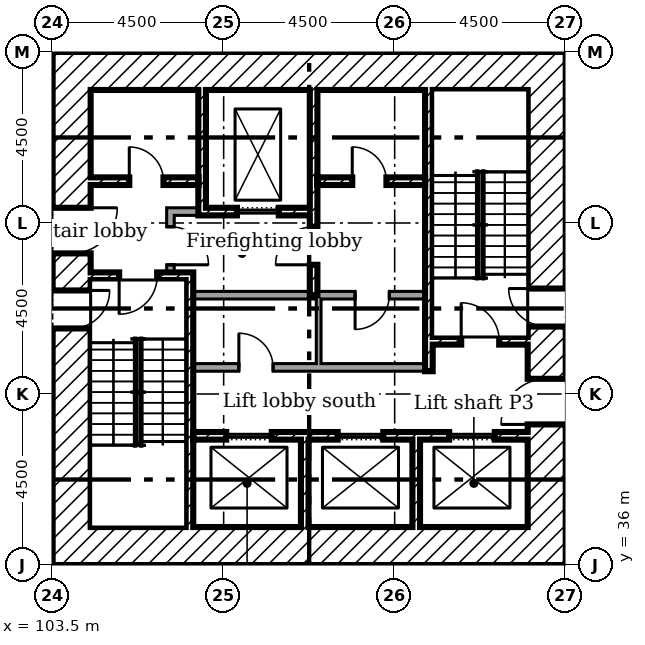
"""IFC4 building model, lengths in metres.
Left out: names, types, materials, properties, quantities, classifications, styles, units other than length and angle.
Written with IfcOpenShell. Run it as: python <this file> out.ifc"""

import sys

from ifc_helpers import new_model, si_unit, direction, frame, frame_2d, origin, place, context, subcontext, project, spatial, rectangle, extrude, element, fill, save


model = new_model("IFC4")
c1 = context("Model", 3, precision=1e-05, world=origin(), true_north=direction((0.0, 1.0)))
c2 = subcontext(c1, "Body", "Model", "MODEL_VIEW")
j1 = project(units=[si_unit("LENGTHUNIT", "METRE"), si_unit("PLANEANGLEUNIT", "RADIAN")], contexts=[c1])
p1 = place(None, origin())
s1 = spatial("IfcSite", under=j1, at=p1, CompositionType="ELEMENT")
p2 = place(p1, origin())
s2 = spatial("IfcBuilding", under=s1, at=p2, CompositionType="ELEMENT")
p3 = place(p2, frame((0.0, 0.0, 6.0)))
s3 = spatial("IfcBuildingStorey", under=s2, at=p3, CompositionType="ELEMENT", Elevation=6.0)
p4 = place(p3, frame((116.5, 36.0, 0.0), z_axis=(0.0, 0.0, 1.0), x_axis=(0.0, 1.0, 0.0)))
e1 = element("IfcWall", 1, at=p4, inside=s3, PredefinedType="SHEAR", context=c2, shape_type="SweptSolid", body=[
    extrude(rectangle(XDim=13.5, YDim=1.0, at=frame_2d((6.75, 0.0))), origin(), (0.0, 0.0, 1.0), 5.0),
])
p5 = place(p4, frame((3.7, 0.0, 0.0)))
e2 = element("IfcOpeningElement", 2, at=p5, cuts=e1, PredefinedType="OPENING", context=c2, shape_type="SweptSolid", body=[
    extrude(rectangle(XDim=1.2, YDim=2.1, at=frame_2d((0.6, 1.05))), frame((0.0, 0.51, 0.0), z_axis=(0.0, -1.0, 0.0), x_axis=(1.0, 0.0, 0.0)), (0.0, 0.0, 1.0), 1.02),
])
p6 = place(p4, frame((6.275, 0.0, 0.0)))
e3 = element("IfcOpeningElement", 3, at=p6, cuts=e1, PredefinedType="OPENING", context=c2, shape_type="SweptSolid", body=[
    extrude(rectangle(XDim=1.0, YDim=2.1, at=frame_2d((0.5, 1.05))), frame((0.0, 0.51, 0.0), z_axis=(0.0, -1.0, 0.0), x_axis=(1.0, 0.0, 0.0)), (0.0, 0.0, 1.0), 1.02),
])
for number, where in (
    (4, (104.5, 49.0, 0.0)),
    (5, (104.5, 36.5, 0.0)),
):
    element("IfcWall", number, at=place(p3, frame(where)), inside=s3, PredefinedType="SHEAR", context=c2, shape_type="SweptSolid", body=[
        extrude(rectangle(XDim=11.5, YDim=1.0, at=frame_2d((5.75, 0.0))), origin(), (0.0, 0.0, 1.0), 5.0),
    ])
p7 = place(p3, frame((104.0, 36.0, 0.0), z_axis=(0.0, 0.0, 1.0), x_axis=(0.0, 1.0, 0.0)))
e6 = element("IfcWall", 6, at=p7, inside=s3, PredefinedType="SHEAR", context=c2, shape_type="SweptSolid", body=[
    extrude(rectangle(XDim=13.5, YDim=1.0, at=frame_2d((6.75, 0.0))), origin(), (0.0, 0.0, 1.0), 5.0),
])
p8 = place(p7, frame((8.2, 0.0, 0.0)))
e7 = element("IfcOpeningElement", 7, at=p8, cuts=e6, PredefinedType="OPENING", context=c2, shape_type="SweptSolid", body=[
    extrude(rectangle(XDim=1.2, YDim=2.1, at=frame_2d((0.6, 1.05))), frame((0.0, 0.51, 0.0), z_axis=(0.0, -1.0, 0.0), x_axis=(1.0, 0.0, 0.0)), (0.0, 0.0, 1.0), 1.02),
])
p9 = place(p7, frame((6.225, 0.0, 0.0)))
e8 = element("IfcOpeningElement", 8, at=p9, cuts=e6, PredefinedType="OPENING", context=c2, shape_type="SweptSolid", body=[
    extrude(rectangle(XDim=1.0, YDim=2.1, at=frame_2d((0.5, 1.05))), frame((0.0, 0.51, 0.0), z_axis=(0.0, -1.0, 0.0), x_axis=(1.0, 0.0, 0.0)), (0.0, 0.0, 1.0), 1.02),
])
p10 = place(p3, frame((107.433, 48.5, 0.0), z_axis=(0.0, 0.0, 1.0), x_axis=(0.0, -1.0, 0.0)))
e9 = element("IfcWall", 9, at=p10, inside=s3, PredefinedType="SHEAR", context=c2, shape_type="SweptSolid", body=[
    extrude(rectangle(XDim=3.3, YDim=0.2, at=frame_2d((1.65, 0.0))), origin(), (0.0, 0.0, 1.0), 5.0),
])
p11 = place(p3, frame((110.367, 48.5, 0.0), z_axis=(0.0, 0.0, 1.0), x_axis=(0.0, -1.0, 0.0)))
e10 = element("IfcWall", 10, at=p11, inside=s3, PredefinedType="SHEAR", context=c2, shape_type="SweptSolid", body=[
    extrude(rectangle(XDim=5.4, YDim=0.2, at=frame_2d((2.7, 0.0))), origin(), (0.0, 0.0, 1.0), 5.0),
])
p12 = place(p11, frame((3.6, 0.0, 0.0)))
e11 = element("IfcOpeningElement", 11, at=p12, cuts=e10, PredefinedType="OPENING", context=c2, shape_type="SweptSolid", body=[
    extrude(rectangle(XDim=1.0, YDim=2.1, at=frame_2d((0.5, 1.05))), frame((0.0, 0.11, 0.0), z_axis=(0.0, -1.0, 0.0), x_axis=(1.0, 0.0, 0.0)), (0.0, 0.0, 1.0), 0.22),
])
for number, where, z_axis, x_axis in (
    (12, (110.133, 37.0, 0.0), (0.0, 0.0, 1.0), (0.0, 1.0, 0.0)),
    (13, (113.067, 37.0, 0.0), (0.0, 0.0, 1.0), (0.0, 1.0, 0.0)),
):
    element("IfcWall", number, at=place(p3, frame(where, z_axis=z_axis, x_axis=x_axis)), inside=s3, PredefinedType="SHEAR", context=c2, shape_type="SweptSolid", body=[
        extrude(rectangle(XDim=2.3, YDim=0.2, at=frame_2d((1.15, 0.0))), origin(), (0.0, 0.0, 1.0), 5.0),
    ])
p13 = place(p3, frame((106.5, 45.3, 0.0)))
e14 = element("IfcWall", 14, at=p13, inside=s3, PredefinedType="PARTITIONING", context=c2, shape_type="SweptSolid", body=[
    extrude(rectangle(XDim=0.833, YDim=0.2, at=frame_2d((0.417, 0.0))), origin(), (0.0, 0.0, 1.0), 5.0),
])
p14 = place(p3, frame((106.6, 43.7, 0.0), z_axis=(0.0, 0.0, 1.0), x_axis=(0.0, 1.0, 0.0)))
e15 = element("IfcWall", 15, at=p14, inside=s3, PredefinedType="PARTITIONING", context=c2, shape_type="SweptSolid", body=[
    extrude(rectangle(XDim=1.5, YDim=0.2, at=frame_2d((0.75, 0.0))), origin(), (0.0, 0.0, 1.0), 5.0),
])
p15 = place(p14, frame((0.2, 0.0, 0.0)))
e16 = element("IfcOpeningElement", 16, at=p15, cuts=e15, PredefinedType="OPENING", context=c2, shape_type="SweptSolid", body=[
    extrude(rectangle(XDim=1.0, YDim=2.1, at=frame_2d((0.5, 1.05))), frame((0.0, 0.11, 0.0), z_axis=(0.0, -1.0, 0.0), x_axis=(1.0, 0.0, 0.0)), (0.0, 0.0, 1.0), 0.22),
])
p16 = place(p3, frame((104.5, 46.1, 0.0)))
e17 = element("IfcWall", 17, at=p16, inside=s3, PredefinedType="SHEAR", context=c2, shape_type="SweptSolid", body=[
    extrude(rectangle(XDim=2.833, YDim=0.2, at=frame_2d((1.417, 0.0))), origin(), (0.0, 0.0, 1.0), 5.0),
])
p17 = place(p16, frame((1.017, 0.0, 0.0)))
e18 = element("IfcOpeningElement", 18, at=p17, cuts=e17, PredefinedType="OPENING", context=c2, shape_type="SweptSolid", body=[
    extrude(rectangle(XDim=0.9, YDim=2.1, at=frame_2d((0.45, 1.05))), frame((0.0, 0.11, 0.0), z_axis=(0.0, -1.0, 0.0), x_axis=(1.0, 0.0, 0.0)), (0.0, 0.0, 1.0), 0.22),
])
p18 = place(p3, frame((110.467, 46.1, 0.0)))
e19 = element("IfcWall", 19, at=p18, inside=s3, PredefinedType="SHEAR", context=c2, shape_type="SweptSolid", body=[
    extrude(rectangle(XDim=2.833, YDim=0.2, at=frame_2d((1.417, 0.0))), origin(), (0.0, 0.0, 1.0), 5.0),
])
p19 = place(p18, frame((0.917, 0.0, 0.0)))
e20 = element("IfcOpeningElement", 20, at=p19, cuts=e19, PredefinedType="OPENING", context=c2, shape_type="SweptSolid", body=[
    extrude(rectangle(XDim=0.9, YDim=2.1, at=frame_2d((0.45, 1.05))), frame((0.0, 0.11, 0.0), z_axis=(0.0, -1.0, 0.0), x_axis=(1.0, 0.0, 0.0)), (0.0, 0.0, 1.0), 0.22),
])
p20 = place(p3, frame((107.533, 45.3, 0.0)))
e21 = element("IfcWall", 21, at=p20, inside=s3, PredefinedType="SHEAR", context=c2, shape_type="SweptSolid", body=[
    extrude(rectangle(XDim=2.733, YDim=0.2, at=frame_2d((1.367, 0.0))), origin(), (0.0, 0.0, 1.0), 5.0),
])
p21 = place(p20, frame((0.817, 0.0, 0.0)))
e22 = element("IfcOpeningElement", 22, at=p21, cuts=e21, PredefinedType="OPENING", context=c2, shape_type="SweptSolid", body=[
    extrude(rectangle(XDim=1.1, YDim=2.1, at=frame_2d((0.55, 1.05))), frame((0.0, 0.11, 0.0), z_axis=(0.0, -1.0, 0.0), x_axis=(1.0, 0.0, 0.0)), (0.0, 0.0, 1.0), 0.22),
])
p22 = place(p3, frame((107.2, 39.4, 0.0)))
e23 = element("IfcWall", 23, at=p22, inside=s3, PredefinedType="SHEAR", context=c2, shape_type="SweptSolid", body=[
    extrude(rectangle(XDim=8.8, YDim=0.2, at=frame_2d((4.4, 0.0))), origin(), (0.0, 0.0, 1.0), 5.0),
])
p23 = place(p22, frame((0.867, 0.0, 0.0)))
e24 = element("IfcOpeningElement", 24, at=p23, cuts=e23, PredefinedType="OPENING", context=c2, shape_type="SweptSolid", body=[
    extrude(rectangle(XDim=1.2, YDim=2.1, at=frame_2d((0.6, 1.05))), frame((0.0, 0.11, 0.0), z_axis=(0.0, -1.0, 0.0), x_axis=(1.0, 0.0, 0.0)), (0.0, 0.0, 1.0), 0.22),
])
p24 = place(p22, frame((3.8, 0.0, 0.0)))
e25 = element("IfcOpeningElement", 25, at=p24, cuts=e23, PredefinedType="OPENING", context=c2, shape_type="SweptSolid", body=[
    extrude(rectangle(XDim=1.2, YDim=2.1, at=frame_2d((0.6, 1.05))), frame((0.0, 0.11, 0.0), z_axis=(0.0, -1.0, 0.0), x_axis=(1.0, 0.0, 0.0)), (0.0, 0.0, 1.0), 0.22),
])
p25 = place(p22, frame((6.733, 0.0, 0.0)))
e26 = element("IfcOpeningElement", 26, at=p25, cuts=e23, PredefinedType="OPENING", context=c2, shape_type="SweptSolid", body=[
    extrude(rectangle(XDim=1.2, YDim=2.1, at=frame_2d((0.6, 1.05))), frame((0.0, 0.11, 0.0), z_axis=(0.0, -1.0, 0.0), x_axis=(1.0, 0.0, 0.0)), (0.0, 0.0, 1.0), 0.22),
])
p26 = place(p3, frame((107.1, 37.0, 0.0), z_axis=(0.0, 0.0, 1.0), x_axis=(0.0, 1.0, 0.0)))
e27 = element("IfcWall", 27, at=p26, inside=s3, PredefinedType="SHEAR", context=c2, shape_type="SweptSolid", body=[
    extrude(rectangle(XDim=6.7, YDim=0.2, at=frame_2d((3.35, 0.0))), origin(), (0.0, 0.0, 1.0), 5.0),
])
p27 = place(p3, frame((104.5, 43.6, 0.0)))
e28 = element("IfcWall", 28, at=p27, inside=s3, PredefinedType="SHEAR", context=c2, shape_type="SweptSolid", body=[
    extrude(rectangle(XDim=2.5, YDim=0.2, at=frame_2d((1.25, 0.0))), origin(), (0.0, 0.0, 1.0), 5.0),
])
p28 = place(p27, frame((0.75, 0.0, 0.0)))
e29 = element("IfcOpeningElement", 29, at=p28, cuts=e28, PredefinedType="OPENING", context=c2, shape_type="SweptSolid", body=[
    extrude(rectangle(XDim=1.0, YDim=2.1, at=frame_2d((0.5, 1.05))), frame((0.0, 0.11, 0.0), z_axis=(0.0, -1.0, 0.0), x_axis=(1.0, 0.0, 0.0)), (0.0, 0.0, 1.0), 0.22),
])
p29 = place(p3, frame((113.5, 41.9, 0.0)))
e30 = element("IfcWall", 30, at=p29, inside=s3, PredefinedType="SHEAR", context=c2, shape_type="SweptSolid", body=[
    extrude(rectangle(XDim=2.5, YDim=0.2, at=frame_2d((1.25, 0.0))), origin(), (0.0, 0.0, 1.0), 5.0),
])
p30 = place(p29, frame((0.75, 0.0, 0.0)))
e31 = element("IfcOpeningElement", 31, at=p30, cuts=e30, PredefinedType="OPENING", context=c2, shape_type="SweptSolid", body=[
    extrude(rectangle(XDim=1.0, YDim=2.1, at=frame_2d((0.5, 1.05))), frame((0.0, 0.11, 0.0), z_axis=(0.0, -1.0, 0.0), x_axis=(1.0, 0.0, 0.0)), (0.0, 0.0, 1.0), 0.22),
])
p31 = place(p3, frame((113.4, 41.1, 0.0), z_axis=(0.0, 0.0, 1.0), x_axis=(0.0, 1.0, 0.0)))
e32 = element("IfcWall", 32, at=p31, inside=s3, PredefinedType="SHEAR", context=c2, shape_type="SweptSolid", body=[
    extrude(rectangle(XDim=7.4, YDim=0.2, at=frame_2d((3.7, 0.0))), origin(), (0.0, 0.0, 1.0), 5.0),
])
p32 = place(p3, frame((107.2, 43.1, 0.0)))
e33 = element("IfcWall", 33, at=p32, inside=s3, PredefinedType="PARTITIONING", context=c2, shape_type="SweptSolid", body=[
    extrude(rectangle(XDim=6.1, YDim=0.2, at=frame_2d((3.05, 0.0))), origin(), (0.0, 0.0, 1.0), 5.0),
])
p33 = place(p32, frame((4.259, 0.0, 0.0)))
e34 = element("IfcOpeningElement", 34, at=p33, cuts=e33, PredefinedType="OPENING", context=c2, shape_type="SweptSolid", body=[
    extrude(rectangle(XDim=0.9, YDim=2.1, at=frame_2d((0.45, 1.05))), frame((0.0, 0.11, 0.0), z_axis=(0.0, -1.0, 0.0), x_axis=(1.0, 0.0, 0.0)), (0.0, 0.0, 1.0), 0.22),
])
p34 = place(p3, frame((107.2, 41.2, 0.0)))
e35 = element("IfcWall", 35, at=p34, inside=s3, PredefinedType="PARTITIONING", context=c2, shape_type="SweptSolid", body=[
    extrude(rectangle(XDim=6.1, YDim=0.2, at=frame_2d((3.05, 0.0))), origin(), (0.0, 0.0, 1.0), 5.0),
])
p35 = place(p34, frame((1.2, 0.0, 0.0)))
e36 = element("IfcOpeningElement", 36, at=p35, cuts=e35, PredefinedType="OPENING", context=c2, shape_type="SweptSolid", body=[
    extrude(rectangle(XDim=0.9, YDim=2.1, at=frame_2d((0.45, 1.05))), frame((0.0, 0.11, 0.0), z_axis=(0.0, -1.0, 0.0), x_axis=(1.0, 0.0, 0.0)), (0.0, 0.0, 1.0), 0.22),
])
p36 = place(p3, frame((110.5, 41.3, 0.0), z_axis=(0.0, 0.0, 1.0), x_axis=(0.0, 1.0, 0.0)))
e37 = element("IfcWall", 37, at=p36, inside=s3, PredefinedType="PARTITIONING", context=c2, shape_type="SweptSolid", body=[
    extrude(rectangle(XDim=1.7, YDim=0.125, at=frame_2d((0.85, 0.0))), origin(), (0.0, 0.0, 1.0), 5.0),
])
p37 = place(p8, frame((1.2, 0.0, 0.0), x_axis=(-1.0, 0.0, 0.0)))
e38 = element("IfcDoor", 38, at=p37, inside=s3, OperationType="SINGLE_SWING_RIGHT", PredefinedType="DOOR", context=c2, shape_type="SweptSolid", body=[
    extrude(rectangle(XDim=1.2, YDim=2.1, at=frame_2d((0.6, 1.05))), frame((0.0, 0.025, 0.0), z_axis=(0.0, -1.0, 0.0), x_axis=(1.0, 0.0, 0.0)), (0.0, 0.0, 1.0), 0.05),
])
fill(e7, e38)
p38 = place(p5, origin())
e39 = element("IfcDoor", 39, at=p38, inside=s3, OperationType="SINGLE_SWING_RIGHT", PredefinedType="DOOR", context=c2, shape_type="SweptSolid", body=[
    extrude(rectangle(XDim=1.2, YDim=2.1, at=frame_2d((0.6, 1.05))), frame((0.0, 0.025, 0.0), z_axis=(0.0, -1.0, 0.0), x_axis=(1.0, 0.0, 0.0)), (0.0, 0.0, 1.0), 0.05),
])
fill(e2, e39)
p39 = place(p28, frame((1.0, 0.0, 0.0), x_axis=(-1.0, 0.0, 0.0)))
e40 = element("IfcDoor", 40, at=p39, inside=s3, OperationType="SINGLE_SWING_LEFT", PredefinedType="DOOR", context=c2, shape_type="SweptSolid", body=[
    extrude(rectangle(XDim=1.0, YDim=2.1, at=frame_2d((0.5, 1.05))), frame((0.0, 0.025, 0.0), z_axis=(0.0, -1.0, 0.0), x_axis=(1.0, 0.0, 0.0)), (0.0, 0.0, 1.0), 0.05),
])
fill(e29, e40)
p40 = place(p9, frame((1.0, 0.0, 0.0), x_axis=(-1.0, 0.0, 0.0)))
e41 = element("IfcDoor", 41, at=p40, inside=s3, OperationType="SINGLE_SWING_RIGHT", PredefinedType="DOOR", context=c2, shape_type="SweptSolid", body=[
    extrude(rectangle(XDim=1.0, YDim=2.1, at=frame_2d((0.5, 1.05))), frame((0.0, 0.025, 0.0), z_axis=(0.0, -1.0, 0.0), x_axis=(1.0, 0.0, 0.0)), (0.0, 0.0, 1.0), 0.05),
])
fill(e8, e41)
p41 = place(p30, origin())
e42 = element("IfcDoor", 42, at=p41, inside=s3, OperationType="SINGLE_SWING_RIGHT", PredefinedType="DOOR", context=c2, shape_type="SweptSolid", body=[
    extrude(rectangle(XDim=1.0, YDim=2.1, at=frame_2d((0.5, 1.05))), frame((0.0, 0.025, 0.0), z_axis=(0.0, -1.0, 0.0), x_axis=(1.0, 0.0, 0.0)), (0.0, 0.0, 1.0), 0.05),
])
fill(e31, e42)
p42 = place(p6, origin())
e43 = element("IfcDoor", 43, at=p42, inside=s3, OperationType="SINGLE_SWING_LEFT", PredefinedType="DOOR", context=c2, shape_type="SweptSolid", body=[
    extrude(rectangle(XDim=1.0, YDim=2.1, at=frame_2d((0.5, 1.05))), frame((0.0, 0.025, 0.0), z_axis=(0.0, -1.0, 0.0), x_axis=(1.0, 0.0, 0.0)), (0.0, 0.0, 1.0), 0.05),
])
fill(e3, e43)
p43 = place(p12, frame((1.0, 0.0, 0.0), x_axis=(-1.0, 0.0, 0.0)))
e44 = element("IfcDoor", 44, at=p43, inside=s3, OperationType="SINGLE_SWING_RIGHT", PredefinedType="DOOR", context=c2, shape_type="SweptSolid", body=[
    extrude(rectangle(XDim=1.0, YDim=2.1, at=frame_2d((0.5, 1.05))), frame((0.0, 0.025, 0.0), z_axis=(0.0, -1.0, 0.0), x_axis=(1.0, 0.0, 0.0)), (0.0, 0.0, 1.0), 0.05),
])
fill(e11, e44)
p44 = place(p15, frame((1.0, 0.0, 0.0), x_axis=(-1.0, 0.0, 0.0)))
e45 = element("IfcDoor", 45, at=p44, inside=s3, OperationType="SINGLE_SWING_LEFT", PredefinedType="DOOR", context=c2, shape_type="SweptSolid", body=[
    extrude(rectangle(XDim=1.0, YDim=2.1, at=frame_2d((0.5, 1.05))), frame((0.0, 0.025, 0.0), z_axis=(0.0, -1.0, 0.0), x_axis=(1.0, 0.0, 0.0)), (0.0, 0.0, 1.0), 0.05),
])
fill(e16, e45)
p45 = place(p17, origin())
e46 = element("IfcDoor", 46, at=p45, inside=s3, OperationType="SINGLE_SWING_RIGHT", PredefinedType="DOOR", context=c2, shape_type="SweptSolid", body=[
    extrude(rectangle(XDim=0.9, YDim=2.1, at=frame_2d((0.45, 1.05))), frame((0.0, 0.025, 0.0), z_axis=(0.0, -1.0, 0.0), x_axis=(1.0, 0.0, 0.0)), (0.0, 0.0, 1.0), 0.05),
])
fill(e18, e46)
p46 = place(p19, origin())
e47 = element("IfcDoor", 47, at=p46, inside=s3, OperationType="SINGLE_SWING_RIGHT", PredefinedType="DOOR", context=c2, shape_type="SweptSolid", body=[
    extrude(rectangle(XDim=0.9, YDim=2.1, at=frame_2d((0.45, 1.05))), frame((0.0, 0.025, 0.0), z_axis=(0.0, -1.0, 0.0), x_axis=(1.0, 0.0, 0.0)), (0.0, 0.0, 1.0), 0.05),
])
fill(e20, e47)
p47 = place(p35, origin())
e48 = element("IfcDoor", 48, at=p47, inside=s3, OperationType="SINGLE_SWING_RIGHT", PredefinedType="DOOR", context=c2, shape_type="SweptSolid", body=[
    extrude(rectangle(XDim=0.9, YDim=2.1, at=frame_2d((0.45, 1.05))), frame((0.0, 0.025, 0.0), z_axis=(0.0, -1.0, 0.0), x_axis=(1.0, 0.0, 0.0)), (0.0, 0.0, 1.0), 0.05),
])
fill(e36, e48)
p48 = place(p33, frame((0.9, 0.0, 0.0), x_axis=(-1.0, 0.0, 0.0)))
e49 = element("IfcDoor", 49, at=p48, inside=s3, OperationType="SINGLE_SWING_LEFT", PredefinedType="DOOR", context=c2, shape_type="SweptSolid", body=[
    extrude(rectangle(XDim=0.9, YDim=2.1, at=frame_2d((0.45, 1.05))), frame((0.0, 0.025, 0.0), z_axis=(0.0, -1.0, 0.0), x_axis=(1.0, 0.0, 0.0)), (0.0, 0.0, 1.0), 0.05),
])
fill(e34, e49)
p49 = place(p21, origin())
e50 = element("IfcDoor", 50, at=p49, inside=s3, OperationType="SLIDING_TO_LEFT", PredefinedType="DOOR", context=c2, shape_type="SweptSolid", body=[
    extrude(rectangle(XDim=1.1, YDim=2.1, at=frame_2d((0.55, 1.05))), frame((0.0, 0.025, 0.0), z_axis=(0.0, -1.0, 0.0), x_axis=(1.0, 0.0, 0.0)), (0.0, 0.0, 1.0), 0.05),
])
fill(e22, e50)
p50 = place(p23, origin())
e51 = element("IfcDoor", 51, at=p50, inside=s3, OperationType="SLIDING_TO_LEFT", PredefinedType="DOOR", context=c2, shape_type="SweptSolid", body=[
    extrude(rectangle(XDim=1.2, YDim=2.1, at=frame_2d((0.6, 1.05))), frame((0.0, 0.025, 0.0), z_axis=(0.0, -1.0, 0.0), x_axis=(1.0, 0.0, 0.0)), (0.0, 0.0, 1.0), 0.05),
])
fill(e24, e51)
p51 = place(p24, origin())
e52 = element("IfcDoor", 52, at=p51, inside=s3, OperationType="SLIDING_TO_LEFT", PredefinedType="DOOR", context=c2, shape_type="SweptSolid", body=[
    extrude(rectangle(XDim=1.2, YDim=2.1, at=frame_2d((0.6, 1.05))), frame((0.0, 0.025, 0.0), z_axis=(0.0, -1.0, 0.0), x_axis=(1.0, 0.0, 0.0)), (0.0, 0.0, 1.0), 0.05),
])
fill(e25, e52)
p52 = place(p25, origin())
e53 = element("IfcDoor", 53, at=p52, inside=s3, OperationType="SLIDING_TO_LEFT", PredefinedType="DOOR", context=c2, shape_type="SweptSolid", body=[
    extrude(rectangle(XDim=1.2, YDim=2.1, at=frame_2d((0.6, 1.05))), frame((0.0, 0.025, 0.0), z_axis=(0.0, -1.0, 0.0), x_axis=(1.0, 0.0, 0.0)), (0.0, 0.0, 1.0), 0.05),
])
fill(e26, e53)
save(model, sys.argv[1])
